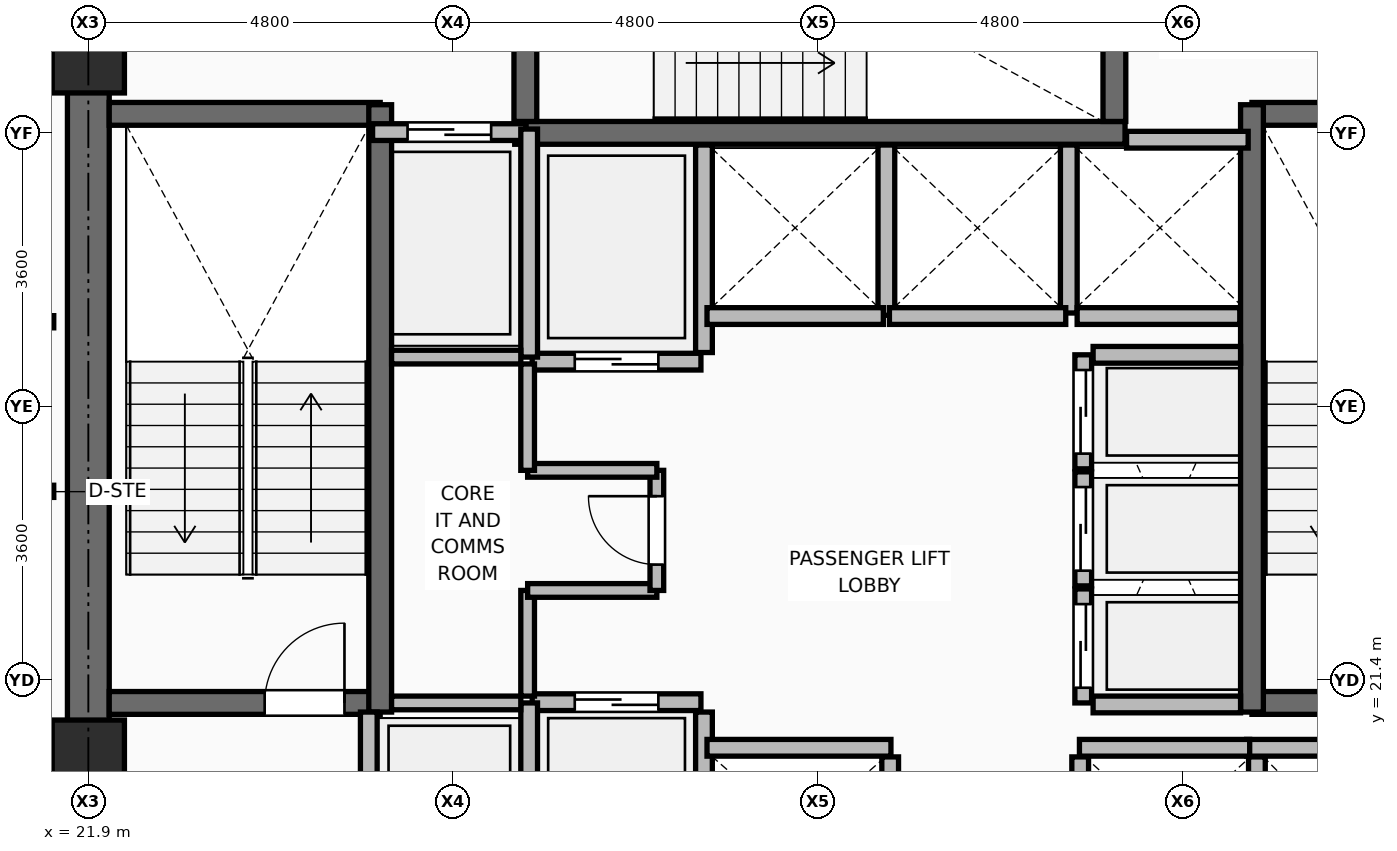
"""IFC4 building model, lengths in metres.
Left out: names, types, materials, properties, quantities, classifications, styles, units other than length and angle.
Written with IfcOpenShell. Run it as: python <this file> out.ifc"""

import sys

from ifc_helpers import new_model, si_unit, direction, frame, frame_2d, origin, origin_2d, place, context, subcontext, project, spatial, rectangle, extrude, element, fill, save


model = new_model("IFC4")
c1 = context("Model", 3, precision=1e-05, world=origin(), true_north=direction((0.0, 1.0)))
c2 = subcontext(c1, "Body", "Model", "MODEL_VIEW")
j1 = project(units=[si_unit("LENGTHUNIT", "METRE"), si_unit("PLANEANGLEUNIT", "RADIAN")], contexts=[c1])
p1 = place(None, origin())
s1 = spatial("IfcSite", under=j1, at=p1, CompositionType="ELEMENT")
p2 = place(p1, origin())
s2 = spatial("IfcBuilding", under=s1, at=p2, CompositionType="ELEMENT")
p3 = place(p2, frame((0.0, 0.0, 172.2)))
s3 = spatial("IfcBuildingStorey", under=s2, at=p3, CompositionType="ELEMENT", Elevation=172.2)
for number, where, z_axis, x_axis in (
    (1, (21.9, 20.4, 0.0), (0.0, 0.0, 1.0), (1.0, 0.0, 0.0)),
    (2, (21.9, 29.6, 0.0), (0.0, 0.0, 1.0), (1.0, 0.0, 0.0)),
):
    element("IfcColumn", number, at=place(p3, frame(where, z_axis=z_axis, x_axis=x_axis)), inside=s3, PredefinedType="COLUMN", context=c2, shape_type="SweptSolid", body=[
        extrude(rectangle(XDim=0.95, YDim=0.95, at=origin_2d()), origin(), (0.0, 0.0, 1.0), 3.75),
    ])
p4 = place(p3, frame((30.0, 18.08, 0.0), z_axis=(0.0, 0.0, 1.0), x_axis=(0.0, 1.0, 0.0)))
e3 = element("IfcWall", 3, at=p4, inside=s3, PredefinedType="PARTITIONING", context=c2, shape_type="SweptSolid", body=[
    extrude(rectangle(XDim=2.9, YDim=0.22, at=frame_2d((1.45, 0.0))), origin(), (0.0, 0.0, 1.0), 3.475),
])
for number, where, z_axis, x_axis in (
    (4, (32.45, 17.92, 0.0), (0.0, 0.0, 1.0), (0.0, 1.0, 0.0)),
    (5, (34.95, 17.92, 0.0), (0.0, 0.0, 1.0), (0.0, 1.0, 0.0)),
):
    element("IfcWall", number, at=place(p3, frame(where, z_axis=z_axis, x_axis=x_axis)), inside=s3, PredefinedType="PARTITIONING", context=c2, shape_type="SweptSolid", body=[
        extrude(rectangle(XDim=2.47, YDim=0.22, at=frame_2d((1.235, 0.0))), origin(), (0.0, 0.0, 1.0), 2.936),
    ])
p5 = place(p3, frame((37.275, 18.08, 0.0), z_axis=(0.0, 0.0, 1.0), x_axis=(0.0, 1.0, 0.0)))
e6 = element("IfcWall", 6, at=p5, inside=s3, PredefinedType="PARTITIONING", context=c2, shape_type="SweptSolid", body=[
    extrude(rectangle(XDim=2.31, YDim=0.22, at=frame_2d((1.155, 0.0))), origin(), (0.0, 0.0, 1.0), 3.475),
])
p6 = place(p3, frame((30.0, 25.71, 0.0), z_axis=(0.0, 0.0, 1.0), x_axis=(0.0, 1.0, 0.0)))
e7 = element("IfcWall", 7, at=p6, inside=s3, PredefinedType="PARTITIONING", context=c2, shape_type="SweptSolid", body=[
    extrude(rectangle(XDim=2.73, YDim=0.22, at=frame_2d((1.365, 0.0))), origin(), (0.0, 0.0, 1.0), 3.475),
])
p7 = place(p3, frame((32.4, 26.2, 0.0), z_axis=(0.0, 0.0, 1.0), x_axis=(0.0, 1.0, 0.0)))
e8 = element("IfcWall", 8, at=p7, inside=s3, PredefinedType="PARTITIONING", context=c2, shape_type="SweptSolid", body=[
    extrude(rectangle(XDim=2.24, YDim=0.22, at=frame_2d((1.12, 0.0))), origin(), (0.0, 0.0, 1.0), 3.475),
])
p8 = place(p3, frame((34.8, 26.23, 0.0), z_axis=(0.0, 0.0, 1.0), x_axis=(0.0, 1.0, 0.0)))
e9 = element("IfcWall", 9, at=p8, inside=s3, PredefinedType="PARTITIONING", context=c2, shape_type="SweptSolid", body=[
    extrude(rectangle(XDim=2.21, YDim=0.22, at=frame_2d((1.105, 0.0))), origin(), (0.0, 0.0, 1.0), 3.475),
])
p9 = place(p3, frame((34.91, 26.19, 0.0), z_axis=(0.0, 0.0, 1.0), x_axis=(1.0, 0.0, 0.0)))
e10 = element("IfcWall", 10, at=p9, inside=s3, PredefinedType="PARTITIONING", context=c2, shape_type="SweptSolid", body=[
    extrude(rectangle(XDim=2.14, YDim=0.22, at=frame_2d((1.07, 0.0))), origin(), (0.0, 0.0, 1.0), 3.475),
])
p10 = place(p3, frame((21.9, 18.075, 0.0), z_axis=(0.0, 0.0, 1.0), x_axis=(0.0, 1.0, 0.0)))
e11 = element("IfcWall", 11, at=p10, inside=s3, PredefinedType="SHEAR", context=c2, shape_type="SweptSolid", body=[
    extrude(rectangle(XDim=14.1, YDim=0.55, at=frame_2d((7.05, 0.0))), origin(), (0.0, 0.0, 1.0), 3.5),
])
p11 = place(p3, frame((22.175, 21.1, 0.0), z_axis=(0.0, 0.0, 1.0), x_axis=(1.0, 0.0, 0.0)))
e12 = element("IfcWall", 12, at=p11, inside=s3, PredefinedType="SHEAR", context=c2, shape_type="SweptSolid", body=[
    extrude(rectangle(XDim=3.565, YDim=0.3, at=frame_2d((1.782, 0.0))), origin(), (0.0, 0.0, 1.0), 3.5),
])
p12 = place(p11, frame((2.045, 0.0, 0.0)))
e13 = element("IfcOpeningElement", 13, at=p12, cuts=e12, PredefinedType="OPENING", context=c2, shape_type="SweptSolid", body=[
    extrude(rectangle(XDim=1.05, YDim=2.1, at=frame_2d((0.525, 1.05))), frame((0.0, 0.16, 0.0), z_axis=(0.0, -1.0, 0.0), x_axis=(1.0, 0.0, 0.0)), (0.0, 0.0, 1.0), 0.32),
])
p13 = place(p3, frame((22.175, 28.85, 0.0), z_axis=(0.0, 0.0, 1.0), x_axis=(1.0, 0.0, 0.0)))
e14 = element("IfcWall", 14, at=p13, inside=s3, PredefinedType="SHEAR", context=c2, shape_type="SweptSolid", body=[
    extrude(rectangle(XDim=3.565, YDim=0.3, at=frame_2d((1.782, 0.0))), origin(), (0.0, 0.0, 1.0), 3.5),
])
p14 = place(p3, frame((25.74, 20.98, 0.0), z_axis=(0.0, 0.0, 1.0), x_axis=(0.0, 1.0, 0.0)))
e15 = element("IfcWall", 15, at=p14, inside=s3, PredefinedType="SHEAR", context=c2, shape_type="SweptSolid", body=[
    extrude(rectangle(XDim=7.99, YDim=0.3, at=frame_2d((3.995, 0.0))), origin(), (0.0, 0.0, 1.0), 3.5),
])
for number, where, z_axis, x_axis in (
    (16, (37.21, 21.1, 0.0), (0.0, 0.0, 1.0), (1.0, 0.0, 0.0)),
    (17, (37.21, 28.85, 0.0), (0.0, 0.0, 1.0), (1.0, 0.0, 0.0)),
):
    element("IfcWall", number, at=place(p3, frame(where, z_axis=z_axis, x_axis=x_axis)), inside=s3, PredefinedType="SHEAR", context=c2, shape_type="SweptSolid", body=[
        extrude(rectangle(XDim=3.615, YDim=0.3, at=frame_2d((1.808, 0.0))), origin(), (0.0, 0.0, 1.0), 3.5),
    ])
p15 = place(p3, frame((37.21, 20.98, 0.0), z_axis=(0.0, 0.0, 1.0), x_axis=(0.0, 1.0, 0.0)))
e18 = element("IfcWall", 18, at=p15, inside=s3, PredefinedType="SHEAR", context=c2, shape_type="SweptSolid", body=[
    extrude(rectangle(XDim=7.99, YDim=0.3, at=frame_2d((3.995, 0.0))), origin(), (0.0, 0.0, 1.0), 3.5),
])
p16 = place(p3, frame((27.51, 28.6, 0.0), z_axis=(0.0, 0.0, 1.0), x_axis=(1.0, 0.0, 0.0)))
e19 = element("IfcWall", 19, at=p16, inside=s3, PredefinedType="SHEAR", context=c2, shape_type="SweptSolid", body=[
    extrude(rectangle(XDim=8.03, YDim=0.3, at=frame_2d((4.015, 0.0))), origin(), (0.0, 0.0, 1.0), 3.5),
])
p17 = place(p3, frame((27.65, 28.75, 0.0), z_axis=(0.0, 0.0, 1.0), x_axis=(0.0, 1.0, 0.0)))
e20 = element("IfcWall", 20, at=p17, inside=s3, PredefinedType="SHEAR", context=c2, shape_type="SweptSolid", body=[
    extrude(rectangle(XDim=3.425, YDim=0.3, at=frame_2d((1.712, 0.0))), origin(), (0.0, 0.0, 1.0), 3.5),
])
p18 = place(p17, frame((1.0, 0.0, 0.0)))
e21 = element("IfcOpeningElement", 21, at=p18, cuts=e20, PredefinedType="OPENING", context=c2, shape_type="SweptSolid", body=[
    extrude(rectangle(XDim=1.05, YDim=2.1, at=frame_2d((0.525, 1.05))), frame((0.0, 0.16, 0.0), z_axis=(0.0, -1.0, 0.0), x_axis=(1.0, 0.0, 0.0)), (0.0, 0.0, 1.0), 0.32),
])
p19 = place(p3, frame((35.4, 28.75, 0.0), z_axis=(0.0, 0.0, 1.0), x_axis=(0.0, 1.0, 0.0)))
e22 = element("IfcWall", 22, at=p19, inside=s3, PredefinedType="SHEAR", context=c2, shape_type="SweptSolid", body=[
    extrude(rectangle(XDim=3.425, YDim=0.3, at=frame_2d((1.712, 0.0))), origin(), (0.0, 0.0, 1.0), 3.5),
])
p20 = place(p3, frame((25.59, 18.22, 0.0), z_axis=(0.0, 0.0, 1.0), x_axis=(0.0, 1.0, 0.0)))
e23 = element("IfcWall", 23, at=p20, inside=s3, PredefinedType="PARTITIONING", context=c2, shape_type="SweptSolid", body=[
    extrude(rectangle(XDim=2.76, YDim=0.22, at=frame_2d((1.38, 0.0))), origin(), (0.0, 0.0, 1.0), 3.48),
])
p21 = place(p20, frame((0.83, 0.0, 0.0)))
e24 = element("IfcOpeningElement", 24, at=p21, cuts=e23, PredefinedType="OPENING", context=c2, shape_type="SweptSolid", body=[
    extrude(rectangle(XDim=1.1, YDim=2.2, at=frame_2d((0.55, 1.1))), frame((0.0, 0.12, 0.0), z_axis=(0.0, -1.0, 0.0), x_axis=(1.0, 0.0, 0.0)), (0.0, 0.0, 1.0), 0.24),
])
p22 = place(p3, frame((25.64, 28.61, 0.0), z_axis=(0.0, 0.0, 1.0), x_axis=(1.0, 0.0, 0.0)))
e25 = element("IfcWall", 25, at=p22, inside=s3, PredefinedType="PARTITIONING", context=c2, shape_type="SweptSolid", body=[
    extrude(rectangle(XDim=2.02, YDim=0.22, at=frame_2d((1.01, 0.0))), origin(), (0.0, 0.0, 1.0), 3.48),
])
p23 = place(p22, frame((0.46, 0.0, 0.0)))
e26 = element("IfcOpeningElement", 26, at=p23, cuts=e25, PredefinedType="OPENING", context=c2, shape_type="SweptSolid", body=[
    extrude(rectangle(XDim=1.1, YDim=2.2, at=frame_2d((0.55, 1.1))), frame((0.0, 0.12, 0.0), z_axis=(0.0, -1.0, 0.0), x_axis=(1.0, 0.0, 0.0)), (0.0, 0.0, 1.0), 0.24),
])
p24 = place(p3, frame((27.74, 21.11, 0.0), z_axis=(0.0, 0.0, 1.0), x_axis=(1.0, 0.0, 0.0)))
e27 = element("IfcWall", 27, at=p24, inside=s3, PredefinedType="PARTITIONING", context=c2, shape_type="SweptSolid", body=[
    extrude(rectangle(XDim=2.22, YDim=0.22, at=frame_2d((1.11, 0.0))), origin(), (0.0, 0.0, 1.0), 3.48),
])
p25 = place(p24, frame((0.56, 0.0, 0.0)))
e28 = element("IfcOpeningElement", 28, at=p25, cuts=e27, PredefinedType="OPENING", context=c2, shape_type="SweptSolid", body=[
    extrude(rectangle(XDim=1.1, YDim=2.2, at=frame_2d((0.55, 1.1))), frame((0.0, 0.12, 0.0), z_axis=(0.0, -1.0, 0.0), x_axis=(1.0, 0.0, 0.0)), (0.0, 0.0, 1.0), 0.24),
])
p26 = place(p3, frame((27.74, 25.59, 0.0), z_axis=(0.0, 0.0, 1.0), x_axis=(1.0, 0.0, 0.0)))
e29 = element("IfcWall", 29, at=p26, inside=s3, PredefinedType="PARTITIONING", context=c2, shape_type="SweptSolid", body=[
    extrude(rectangle(XDim=2.22, YDim=0.22, at=frame_2d((1.11, 0.0))), origin(), (0.0, 0.0, 1.0), 3.48),
])
p27 = place(p26, frame((0.56, 0.0, 0.0)))
e30 = element("IfcOpeningElement", 30, at=p27, cuts=e29, PredefinedType="OPENING", context=c2, shape_type="SweptSolid", body=[
    extrude(rectangle(XDim=1.1, YDim=2.2, at=frame_2d((0.55, 1.1))), frame((0.0, 0.12, 0.0), z_axis=(0.0, -1.0, 0.0), x_axis=(1.0, 0.0, 0.0)), (0.0, 0.0, 1.0), 0.24),
])
p28 = place(p3, frame((30.04, 20.51, 0.0), z_axis=(0.0, 0.0, 1.0), x_axis=(1.0, 0.0, 0.0)))
e31 = element("IfcWall", 31, at=p28, inside=s3, PredefinedType="PARTITIONING", context=c2, shape_type="SweptSolid", body=[
    extrude(rectangle(XDim=2.42, YDim=0.22, at=frame_2d((1.21, 0.0))), origin(), (0.0, 0.0, 1.0), 3.48),
])
for number, where, z_axis, x_axis in (
    (32, (37.14, 20.51, 0.0), (0.0, 0.0, 1.0), (1.0, 0.0, 0.0)),
    (33, (34.94, 20.51, 0.0), (0.0, 0.0, 1.0), (1.0, 0.0, 0.0)),
):
    element("IfcWall", number, at=place(p3, frame(where, z_axis=z_axis, x_axis=x_axis)), inside=s3, PredefinedType="PARTITIONING", context=c2, shape_type="SweptSolid", body=[
        extrude(rectangle(XDim=2.24, YDim=0.22, at=frame_2d((1.12, 0.0))), origin(), (0.0, 0.0, 1.0), 3.48),
    ])
for number, where, z_axis, x_axis in (
    (34, (30.04, 26.19, 0.0), (0.0, 0.0, 1.0), (1.0, 0.0, 0.0)),
    (35, (32.44, 26.19, 0.0), (0.0, 0.0, 1.0), (1.0, 0.0, 0.0)),
):
    element("IfcWall", number, at=place(p3, frame(where, z_axis=z_axis, x_axis=x_axis)), inside=s3, PredefinedType="PARTITIONING", context=c2, shape_type="SweptSolid", body=[
        extrude(rectangle(XDim=2.32, YDim=0.22, at=frame_2d((1.16, 0.0))), origin(), (0.0, 0.0, 1.0), 3.48),
    ])
p29 = place(p3, frame((35.56, 28.51, 0.0), z_axis=(0.0, 0.0, 1.0), x_axis=(1.0, 0.0, 0.0)))
e36 = element("IfcWall", 36, at=p29, inside=s3, PredefinedType="PARTITIONING", context=c2, shape_type="SweptSolid", body=[
    extrude(rectangle(XDim=1.6, YDim=0.22, at=frame_2d((0.8, 0.0))), origin(), (0.0, 0.0, 1.0), 3.48),
])
p30 = place(p3, frame((34.99, 21.1, 0.0), z_axis=(0.0, 0.0, 1.0), x_axis=(0.0, 1.0, 0.0)))
e37 = element("IfcWall", 37, at=p30, inside=s3, PredefinedType="PARTITIONING", context=c2, shape_type="SweptSolid", body=[
    extrude(rectangle(XDim=1.5, YDim=0.22, at=frame_2d((0.75, 0.0))), origin(), (0.0, 0.0, 1.0), 3.48),
])
p31 = place(p30, frame((0.2, 0.0, 0.0)))
e38 = element("IfcOpeningElement", 38, at=p31, cuts=e37, PredefinedType="OPENING", context=c2, shape_type="SweptSolid", body=[
    extrude(rectangle(XDim=1.1, YDim=2.2, at=frame_2d((0.55, 1.1))), frame((0.0, 0.12, 0.0), z_axis=(0.0, -1.0, 0.0), x_axis=(1.0, 0.0, 0.0)), (0.0, 0.0, 1.0), 0.24),
])
p32 = place(p3, frame((34.99, 22.64, 0.0), z_axis=(0.0, 0.0, 1.0), x_axis=(0.0, 1.0, 0.0)))
e39 = element("IfcWall", 39, at=p32, inside=s3, PredefinedType="PARTITIONING", context=c2, shape_type="SweptSolid", body=[
    extrude(rectangle(XDim=1.5, YDim=0.22, at=frame_2d((0.75, 0.0))), origin(), (0.0, 0.0, 1.0), 3.48),
])
p33 = place(p32, frame((0.2, 0.0, 0.0)))
e40 = element("IfcOpeningElement", 40, at=p33, cuts=e39, PredefinedType="OPENING", context=c2, shape_type="SweptSolid", body=[
    extrude(rectangle(XDim=1.1, YDim=2.2, at=frame_2d((0.55, 1.1))), frame((0.0, 0.12, 0.0), z_axis=(0.0, -1.0, 0.0), x_axis=(1.0, 0.0, 0.0)), (0.0, 0.0, 1.0), 0.24),
])
p34 = place(p3, frame((34.99, 24.18, 0.0), z_axis=(0.0, 0.0, 1.0), x_axis=(0.0, 1.0, 0.0)))
e41 = element("IfcWall", 41, at=p34, inside=s3, PredefinedType="PARTITIONING", context=c2, shape_type="SweptSolid", body=[
    extrude(rectangle(XDim=1.5, YDim=0.22, at=frame_2d((0.75, 0.0))), origin(), (0.0, 0.0, 1.0), 3.48),
])
p35 = place(p34, frame((0.2, 0.0, 0.0)))
e42 = element("IfcOpeningElement", 42, at=p35, cuts=e41, PredefinedType="OPENING", context=c2, shape_type="SweptSolid", body=[
    extrude(rectangle(XDim=1.1, YDim=2.2, at=frame_2d((0.55, 1.1))), frame((0.0, 0.12, 0.0), z_axis=(0.0, -1.0, 0.0), x_axis=(1.0, 0.0, 0.0)), (0.0, 0.0, 1.0), 0.24),
])
p36 = place(p3, frame((27.7, 18.15, 0.0), z_axis=(0.0, 0.0, 1.0), x_axis=(0.0, 1.0, 0.0)))
e43 = element("IfcWall", 43, at=p36, inside=s3, PredefinedType="PARTITIONING", context=c2, shape_type="SweptSolid", body=[
    extrude(rectangle(XDim=2.95, YDim=0.22, at=frame_2d((1.475, 0.0))), origin(), (0.0, 0.0, 1.0), 3.48),
])
p37 = place(p3, frame((27.7, 25.65, 0.0), z_axis=(0.0, 0.0, 1.0), x_axis=(0.0, 1.0, 0.0)))
e44 = element("IfcWall", 44, at=p37, inside=s3, PredefinedType="PARTITIONING", context=c2, shape_type="SweptSolid", body=[
    extrude(rectangle(XDim=3.0, YDim=0.22, at=frame_2d((1.5, 0.0))), origin(), (0.0, 0.0, 1.0), 3.48),
])
for number, where, z_axis, x_axis in (
    (45, (35.12, 21.08, 0.0), (0.0, 0.0, 1.0), (1.0, 0.0, 0.0)),
    (46, (35.12, 25.68, 0.0), (0.0, 0.0, 1.0), (1.0, 0.0, 0.0)),
):
    element("IfcWall", number, at=place(p3, frame(where, z_axis=z_axis, x_axis=x_axis)), inside=s3, PredefinedType="PARTITIONING", context=c2, shape_type="SweptSolid", body=[
        extrude(rectangle(XDim=1.94, YDim=0.22, at=frame_2d((0.97, 0.0))), origin(), (0.0, 0.0, 1.0), 3.48),
    ])
for number, where, z_axis, x_axis in (
    (47, (25.89, 21.1, 0.0), (0.0, 0.0, 1.0), (1.0, 0.0, 0.0)),
    (48, (25.89, 25.65, 0.0), (0.0, 0.0, 1.0), (1.0, 0.0, 0.0)),
):
    element("IfcWall", number, at=place(p3, frame(where, z_axis=z_axis, x_axis=x_axis)), inside=s3, PredefinedType="PARTITIONING", context=c2, shape_type="SweptSolid", body=[
        extrude(rectangle(XDim=1.7, YDim=0.18, at=frame_2d((0.85, 0.0))), origin(), (0.0, 0.0, 1.0), 3.48),
    ])
p38 = place(p3, frame((27.68, 21.19, 0.0), z_axis=(0.0, 0.0, 1.0), x_axis=(0.0, 1.0, 0.0)))
e49 = element("IfcWall", 49, at=p38, inside=s3, PredefinedType="PARTITIONING", context=c2, shape_type="SweptSolid", body=[
    extrude(rectangle(XDim=1.39, YDim=0.18, at=frame_2d((0.695, 0.0))), origin(), (0.0, 0.0, 1.0), 3.48),
])
p39 = place(p3, frame((27.68, 22.58, 0.0), z_axis=(0.0, 0.0, 1.0), x_axis=(1.0, 0.0, 0.0)))
e50 = element("IfcWall", 50, at=p39, inside=s3, PredefinedType="PARTITIONING", context=c2, shape_type="SweptSolid", body=[
    extrude(rectangle(XDim=1.7, YDim=0.18, at=frame_2d((0.85, 0.0))), origin(), (0.0, 0.0, 1.0), 3.48),
])
p40 = place(p3, frame((29.38, 22.58, 0.0), z_axis=(0.0, 0.0, 1.0), x_axis=(0.0, 1.0, 0.0)))
e51 = element("IfcWall", 51, at=p40, inside=s3, PredefinedType="PARTITIONING", context=c2, shape_type="SweptSolid", body=[
    extrude(rectangle(XDim=1.58, YDim=0.18, at=frame_2d((0.79, 0.0))), origin(), (0.0, 0.0, 1.0), 3.48),
])
p41 = place(p40, frame((0.34, 0.0, 0.0)))
e52 = element("IfcOpeningElement", 52, at=p41, cuts=e51, PredefinedType="OPENING", context=c2, shape_type="SweptSolid", body=[
    extrude(rectangle(XDim=0.9, YDim=2.1, at=frame_2d((0.45, 1.05))), frame((0.0, 0.1, 0.0), z_axis=(0.0, -1.0, 0.0), x_axis=(1.0, 0.0, 0.0)), (0.0, 0.0, 1.0), 0.2),
])
p42 = place(p3, frame((27.68, 24.16, 0.0), z_axis=(0.0, 0.0, 1.0), x_axis=(1.0, 0.0, 0.0)))
e53 = element("IfcWall", 53, at=p42, inside=s3, PredefinedType="PARTITIONING", context=c2, shape_type="SweptSolid", body=[
    extrude(rectangle(XDim=1.7, YDim=0.18, at=frame_2d((0.85, 0.0))), origin(), (0.0, 0.0, 1.0), 3.48),
])
p43 = place(p3, frame((27.68, 24.16, 0.0), z_axis=(0.0, 0.0, 1.0), x_axis=(0.0, 1.0, 0.0)))
e54 = element("IfcWall", 54, at=p43, inside=s3, PredefinedType="PARTITIONING", context=c2, shape_type="SweptSolid", body=[
    extrude(rectangle(XDim=1.4, YDim=0.18, at=frame_2d((0.7, 0.0))), origin(), (0.0, 0.0, 1.0), 3.48),
])
p44 = place(p3, frame((21.445, 26.115, 0.0), z_axis=(0.0, 0.0, 1.0), x_axis=(-0.999998527672, 0.001715999189, 0.0)))
e55 = element("IfcWall", 55, at=p44, inside=s3, PredefinedType="PARTITIONING", context=c2, shape_type="SweptSolid", body=[
    extrude(rectangle(XDim=1.138, YDim=0.16, at=frame_2d((0.569, 0.0))), origin(), (0.0, 0.0, 1.0), 2.525),
])
p45 = place(p3, frame((16.911, 23.858, 0.0), z_axis=(0.0, 0.0, 1.0), x_axis=(0.999983403772, 0.005761265572, 0.0)))
e56 = element("IfcWall", 56, at=p45, inside=s3, PredefinedType="PARTITIONING", context=c2, shape_type="SweptSolid", body=[
    extrude(rectangle(XDim=4.534, YDim=0.16, at=frame_2d((2.267, 0.0))), origin(), (0.0, 0.0, 1.0), 2.525),
])
p46 = place(p45, frame((3.174, 0.0, 0.0)))
e57 = element("IfcOpeningElement", 57, at=p46, cuts=e56, PredefinedType="OPENING", context=c2, shape_type="SweptSolid", body=[
    extrude(rectangle(XDim=1.2, YDim=2.1, at=frame_2d((0.6, 1.05))), frame((0.0, 0.09, 0.0), z_axis=(0.0, -1.0, 0.0), x_axis=(1.0, 0.0, 0.0)), (0.0, 0.0, 1.0), 0.18),
])
p47 = place(p12, origin())
e58 = element("IfcDoor", 58, at=p47, inside=s3, OperationType="SINGLE_SWING_RIGHT", PredefinedType="DOOR", context=c2, shape_type="SweptSolid", body=[
    extrude(rectangle(XDim=1.05, YDim=2.1, at=frame_2d((0.525, 1.05))), frame((0.0, 0.025, 0.0), z_axis=(0.0, -1.0, 0.0), x_axis=(1.0, 0.0, 0.0)), (0.0, 0.0, 1.0), 0.05),
])
fill(e13, e58)
p48 = place(p23, origin())
e59 = element("IfcDoor", 59, at=p48, inside=s3, OperationType="DOUBLE_DOOR_SLIDING", PredefinedType="DOOR", context=c2, shape_type="SweptSolid", body=[
    extrude(rectangle(XDim=1.1, YDim=2.2, at=frame_2d((0.55, 1.1))), frame((0.0, 0.025, 0.0), z_axis=(0.0, -1.0, 0.0), x_axis=(1.0, 0.0, 0.0)), (0.0, 0.0, 1.0), 0.05),
])
fill(e26, e59)
p49 = place(p25, origin())
e60 = element("IfcDoor", 60, at=p49, inside=s3, OperationType="DOUBLE_DOOR_SLIDING", PredefinedType="DOOR", context=c2, shape_type="SweptSolid", body=[
    extrude(rectangle(XDim=1.1, YDim=2.2, at=frame_2d((0.55, 1.1))), frame((0.0, 0.025, 0.0), z_axis=(0.0, -1.0, 0.0), x_axis=(1.0, 0.0, 0.0)), (0.0, 0.0, 1.0), 0.05),
])
fill(e28, e60)
p50 = place(p27, frame((1.1, 0.0, 0.0), z_axis=(0.0, 0.0, 1.0), x_axis=(-1.0, 0.0, 0.0)))
e61 = element("IfcDoor", 61, at=p50, inside=s3, OperationType="DOUBLE_DOOR_SLIDING", PredefinedType="DOOR", context=c2, shape_type="SweptSolid", body=[
    extrude(rectangle(XDim=1.1, YDim=2.2, at=frame_2d((0.55, 1.1))), frame((0.0, 0.025, 0.0), z_axis=(0.0, -1.0, 0.0), x_axis=(1.0, 0.0, 0.0)), (0.0, 0.0, 1.0), 0.05),
])
fill(e30, e61)
p51 = place(p31, origin())
e62 = element("IfcDoor", 62, at=p51, inside=s3, OperationType="DOUBLE_DOOR_SLIDING", PredefinedType="DOOR", context=c2, shape_type="SweptSolid", body=[
    extrude(rectangle(XDim=1.1, YDim=2.2, at=frame_2d((0.55, 1.1))), frame((0.0, 0.025, 0.0), z_axis=(0.0, -1.0, 0.0), x_axis=(1.0, 0.0, 0.0)), (0.0, 0.0, 1.0), 0.05),
])
fill(e38, e62)
p52 = place(p33, origin())
e63 = element("IfcDoor", 63, at=p52, inside=s3, OperationType="DOUBLE_DOOR_SLIDING", PredefinedType="DOOR", context=c2, shape_type="SweptSolid", body=[
    extrude(rectangle(XDim=1.1, YDim=2.2, at=frame_2d((0.55, 1.1))), frame((0.0, 0.025, 0.0), z_axis=(0.0, -1.0, 0.0), x_axis=(1.0, 0.0, 0.0)), (0.0, 0.0, 1.0), 0.05),
])
fill(e40, e63)
p53 = place(p35, origin())
e64 = element("IfcDoor", 64, at=p53, inside=s3, OperationType="DOUBLE_DOOR_SLIDING", PredefinedType="DOOR", context=c2, shape_type="SweptSolid", body=[
    extrude(rectangle(XDim=1.1, YDim=2.2, at=frame_2d((0.55, 1.1))), frame((0.0, 0.025, 0.0), z_axis=(0.0, -1.0, 0.0), x_axis=(1.0, 0.0, 0.0)), (0.0, 0.0, 1.0), 0.05),
])
fill(e42, e64)
p54 = place(p41, origin())
e65 = element("IfcDoor", 65, at=p54, inside=s3, OperationType="SINGLE_SWING_RIGHT", PredefinedType="DOOR", context=c2, shape_type="SweptSolid", body=[
    extrude(rectangle(XDim=0.9, YDim=2.1, at=frame_2d((0.45, 1.05))), frame((0.0, 0.025, 0.0), z_axis=(0.0, -1.0, 0.0), x_axis=(1.0, 0.0, 0.0)), (0.0, 0.0, 1.0), 0.05),
])
fill(e52, e65)
save(model, sys.argv[1])
